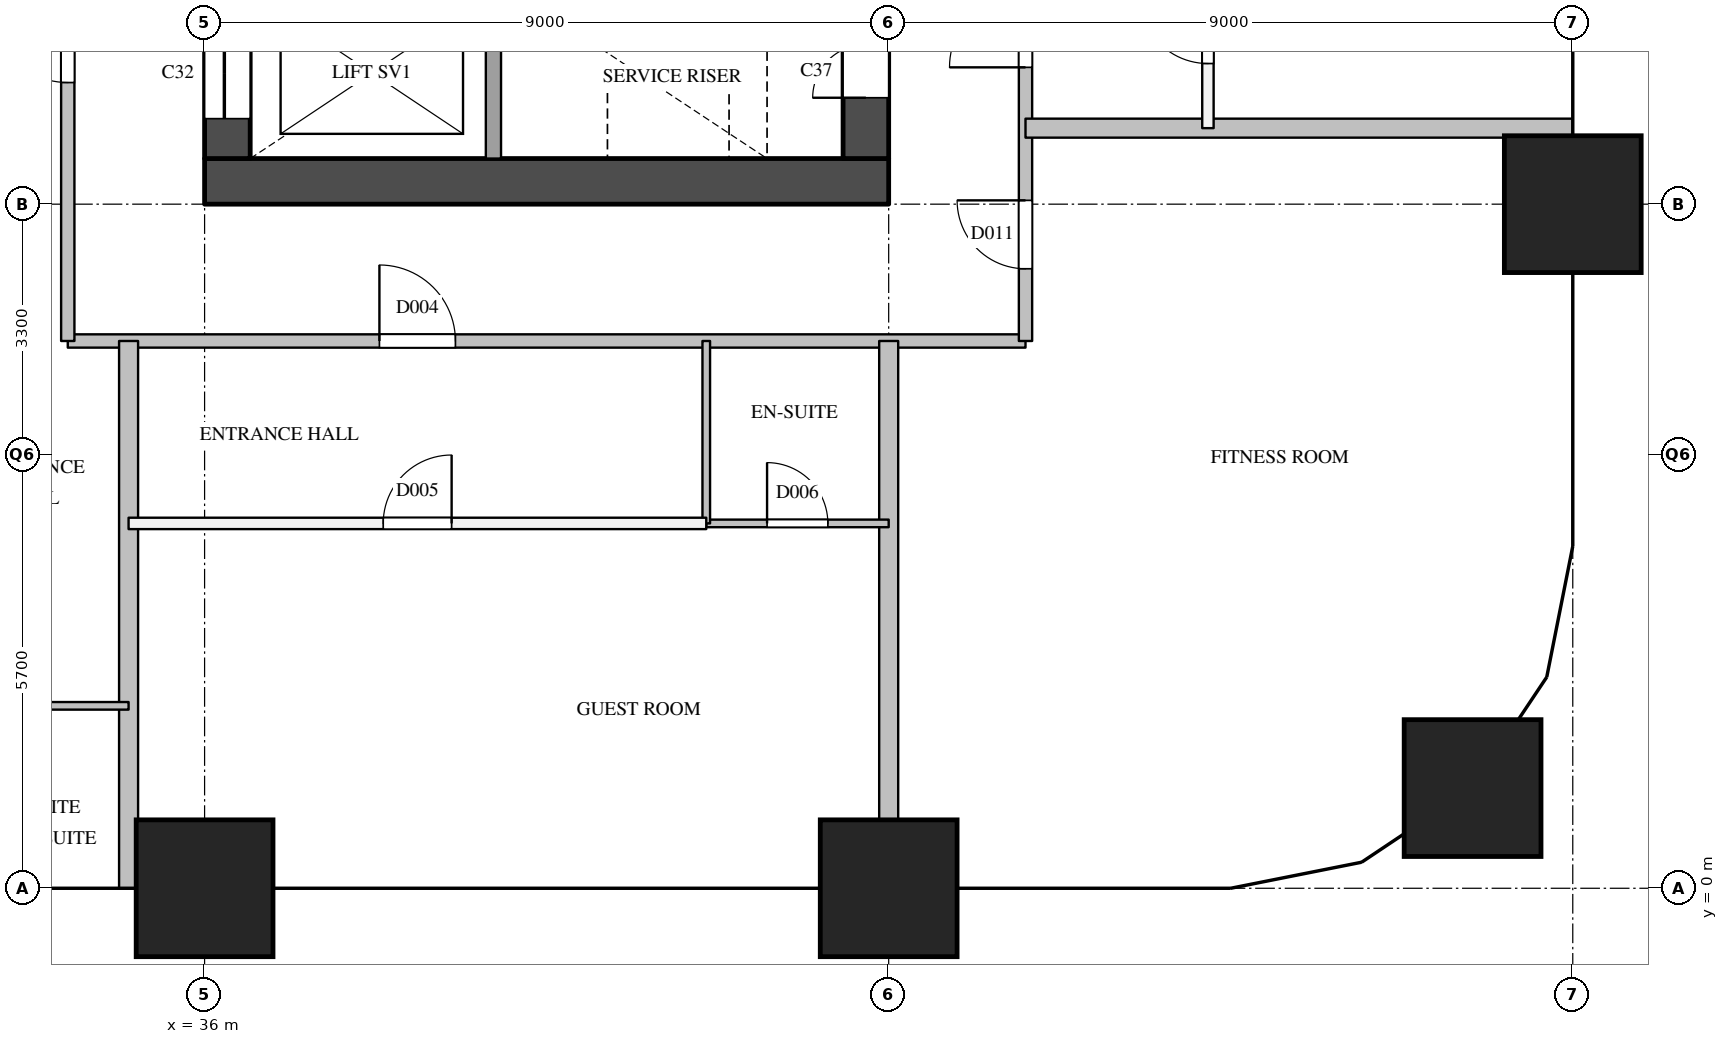
"""IFC4 building model, lengths in metres.
Left out: names, types, materials, properties, quantities, classifications, styles, units other than length and angle.
Written with IfcOpenShell. Run it as: python <this file> out.ifc"""

import sys

from ifc_helpers import new_model, si_unit, direction, frame, frame_2d, origin, origin_2d, place, context, subcontext, project, spatial, rectangle, extrude, element, fill, save


model = new_model("IFC4")
c1 = context("Model", 3, precision=1e-05, world=origin(), true_north=direction((0.0, 1.0)))
c2 = subcontext(c1, "Body", "Model", "MODEL_VIEW")
j1 = project(units=[si_unit("LENGTHUNIT", "METRE"), si_unit("PLANEANGLEUNIT", "RADIAN")], contexts=[c1])
p1 = place(None, origin())
s1 = spatial("IfcSite", under=j1, at=p1, CompositionType="ELEMENT")
p2 = place(p1, origin())
s2 = spatial("IfcBuilding", under=s1, at=p2, CompositionType="ELEMENT")
p3 = place(p2, frame((0.0, 0.0, 72.8)))
s3 = spatial("IfcBuildingStorey", under=s2, at=p3, CompositionType="ELEMENT", Elevation=72.8)
for number, where, z_axis, x_axis in (
    (1, (36.0, 0.0, 0.0), (0.0, 0.0, 1.0), (1.0, 0.0, 0.0)),
    (2, (45.0, 0.0, 0.0), (0.0, 0.0, 1.0), (1.0, 0.0, 0.0)),
    (3, (52.682, 1.318, 0.0), (0.0, 0.0, 1.0), (1.0, 0.0, 0.0)),
    (4, (54.0, 9.0, 0.0), (0.0, 0.0, 1.0), (1.0, 0.0, 0.0)),
):
    element("IfcColumn", number, at=place(p3, frame(where, z_axis=z_axis, x_axis=x_axis)), inside=s3, PredefinedType="COLUMN", context=c2, shape_type="SweptSolid", body=[
        extrude(rectangle(XDim=1.8, YDim=1.8, at=origin_2d()), origin(), (0.0, 0.0, 1.0), 5.0),
    ])
p4 = place(p3, frame((36.0, 9.3, 0.0), z_axis=(0.0, 0.0, 1.0), x_axis=(1.0, 0.0, 0.0)))
e5 = element("IfcWall", 5, at=p4, inside=s3, PredefinedType="SHEAR", context=c2, shape_type="SweptSolid", body=[
    extrude(rectangle(XDim=9.0, YDim=0.6, at=frame_2d((4.5, 0.0))), origin(), (0.0, 0.0, 1.0), 4.7),
])
p5 = place(p3, frame((36.3, 9.6, 0.0), z_axis=(0.0, 0.0, 1.0), x_axis=(0.0, 1.0, 0.0)))
e6 = element("IfcWall", 6, at=p5, inside=s3, PredefinedType="SHEAR", context=c2, shape_type="SweptSolid", body=[
    extrude(rectangle(XDim=12.3, YDim=0.6, at=frame_2d((6.15, 0.0))), origin(), (0.0, 0.0, 1.0), 4.7),
])
p6 = place(p5, frame((0.525, 0.0, 0.0)))
e7 = element("IfcOpeningElement", 7, at=p6, cuts=e6, PredefinedType="OPENING", context=c2, shape_type="SweptSolid", body=[
    extrude(rectangle(XDim=1.2, YDim=2.1, at=frame_2d((0.6, 1.05))), frame((0.0, 0.31, 0.0), z_axis=(0.0, -1.0, 0.0), x_axis=(1.0, 0.0, 0.0)), (0.0, 0.0, 1.0), 0.62),
])
p7 = place(p5, frame((4.8, 0.0, 0.0)))
e8 = element("IfcOpeningElement", 8, at=p7, cuts=e6, PredefinedType="OPENING", context=c2, shape_type="SweptSolid", body=[
    extrude(rectangle(XDim=1.0, YDim=2.1, at=frame_2d((0.5, 1.05))), frame((0.0, 0.31, 0.0), z_axis=(0.0, -1.0, 0.0), x_axis=(1.0, 0.0, 0.0)), (0.0, 0.0, 1.0), 0.62),
])
p8 = place(p3, frame((44.7, 9.6, 0.0), z_axis=(0.0, 0.0, 1.0), x_axis=(0.0, 1.0, 0.0)))
e9 = element("IfcWall", 9, at=p8, inside=s3, PredefinedType="SHEAR", context=c2, shape_type="SweptSolid", body=[
    extrude(rectangle(XDim=12.3, YDim=0.6, at=frame_2d((6.15, 0.0))), origin(), (0.0, 0.0, 1.0), 4.7),
])
p9 = place(p8, frame((0.8, 0.0, 0.0)))
e10 = element("IfcOpeningElement", 10, at=p9, cuts=e9, PredefinedType="OPENING", context=c2, shape_type="SweptSolid", body=[
    extrude(rectangle(XDim=0.7, YDim=2.1, at=frame_2d((0.35, 1.05))), frame((0.0, 0.31, 0.0), z_axis=(0.0, -1.0, 0.0), x_axis=(1.0, 0.0, 0.0)), (0.0, 0.0, 1.0), 0.62),
])
p10 = place(p3, frame((39.8, 9.6, 0.0), z_axis=(0.0, 0.0, 1.0), x_axis=(0.0, 1.0, 0.0)))
e11 = element("IfcWall", 11, at=p10, inside=s3, PredefinedType="SOLIDWALL", context=c2, shape_type="SweptSolid", body=[
    extrude(rectangle(XDim=2.3, YDim=0.2, at=frame_2d((1.15, 0.0))), origin(), (0.0, 0.0, 1.0), 4.7),
])
p11 = place(p3, frame((34.2, 7.2, 0.0), z_axis=(0.0, 0.0, 1.0), x_axis=(1.0, 0.0, 0.0)))
e12 = element("IfcWall", 12, at=p11, inside=s3, PredefinedType="PARTITIONING", context=c2, shape_type="SweptSolid", body=[
    extrude(rectangle(XDim=12.6, YDim=0.175, at=frame_2d((6.3, 0.0))), origin(), (0.0, 0.0, 1.0), 4.7),
])
p12 = place(p11, frame((4.1, 0.0, 0.0)))
e13 = element("IfcOpeningElement", 13, at=p12, cuts=e12, PredefinedType="OPENING", context=c2, shape_type="SweptSolid", body=[
    extrude(rectangle(XDim=1.0, YDim=2.1, at=frame_2d((0.5, 1.05))), frame((0.0, 0.097, 0.0), z_axis=(0.0, -1.0, 0.0), x_axis=(1.0, 0.0, 0.0)), (0.0, 0.0, 1.0), 0.195),
])
p13 = place(p3, frame((34.2, 7.2, 0.0), z_axis=(0.0, 0.0, 1.0), x_axis=(0.0, 1.0, 0.0)))
e14 = element("IfcWall", 14, at=p13, inside=s3, PredefinedType="PARTITIONING", context=c2, shape_type="SweptSolid", body=[
    extrude(rectangle(XDim=16.49, YDim=0.175, at=frame_2d((8.245, 0.0))), origin(), (0.0, 0.0, 1.0), 4.7),
])
p14 = place(p13, frame((3.4, 0.0, 0.0)))
e15 = element("IfcOpeningElement", 15, at=p14, cuts=e14, PredefinedType="OPENING", context=c2, shape_type="SweptSolid", body=[
    extrude(rectangle(XDim=1.0, YDim=2.1, at=frame_2d((0.5, 1.05))), frame((0.0, 0.097, 0.0), z_axis=(0.0, -1.0, 0.0), x_axis=(1.0, 0.0, 0.0)), (0.0, 0.0, 1.0), 0.195),
])
p15 = place(p13, frame((11.645, 0.0, 0.0)))
e16 = element("IfcOpeningElement", 16, at=p15, cuts=e14, PredefinedType="OPENING", context=c2, shape_type="SweptSolid", body=[
    extrude(rectangle(XDim=1.0, YDim=2.1, at=frame_2d((0.5, 1.05))), frame((0.0, 0.097, 0.0), z_axis=(0.0, -1.0, 0.0), x_axis=(1.0, 0.0, 0.0)), (0.0, 0.0, 1.0), 0.195),
])
p16 = place(p3, frame((46.8, 7.2, 0.0), z_axis=(0.0, 0.0, 1.0), x_axis=(0.0, 1.0, 0.0)))
e17 = element("IfcWall", 17, at=p16, inside=s3, PredefinedType="PARTITIONING", context=c2, shape_type="SweptSolid", body=[
    extrude(rectangle(XDim=16.49, YDim=0.175, at=frame_2d((8.245, 0.0))), origin(), (0.0, 0.0, 1.0), 4.7),
])
p17 = place(p16, frame((0.95, 0.0, 0.0)))
e18 = element("IfcOpeningElement", 18, at=p17, cuts=e17, PredefinedType="OPENING", context=c2, shape_type="SweptSolid", body=[
    extrude(rectangle(XDim=0.9, YDim=2.1, at=frame_2d((0.45, 1.05))), frame((0.0, 0.097, 0.0), z_axis=(0.0, -1.0, 0.0), x_axis=(1.0, 0.0, 0.0)), (0.0, 0.0, 1.0), 0.195),
])
p18 = place(p16, frame((3.6, 0.0, 0.0)))
e19 = element("IfcOpeningElement", 19, at=p18, cuts=e17, PredefinedType="OPENING", context=c2, shape_type="SweptSolid", body=[
    extrude(rectangle(XDim=1.0, YDim=2.1, at=frame_2d((0.5, 1.05))), frame((0.0, 0.097, 0.0), z_axis=(0.0, -1.0, 0.0), x_axis=(1.0, 0.0, 0.0)), (0.0, 0.0, 1.0), 0.195),
])
p19 = place(p16, frame((11.1, 0.0, 0.0)))
e20 = element("IfcOpeningElement", 20, at=p19, cuts=e17, PredefinedType="OPENING", context=c2, shape_type="SweptSolid", body=[
    extrude(rectangle(XDim=1.0, YDim=2.1, at=frame_2d((0.5, 1.05))), frame((0.0, 0.097, 0.0), z_axis=(0.0, -1.0, 0.0), x_axis=(1.0, 0.0, 0.0)), (0.0, 0.0, 1.0), 0.195),
])
p20 = place(p3, frame((35.0, 4.8, 0.0), z_axis=(0.0, 0.0, 1.0), x_axis=(1.0, 0.0, 0.0)))
e21 = element("IfcWall", 21, at=p20, inside=s3, PredefinedType="PARTITIONING", context=c2, shape_type="SweptSolid", body=[
    extrude(rectangle(XDim=7.6, YDim=0.15, at=frame_2d((3.8, 0.0))), origin(), (0.0, 0.0, 1.0), 4.7),
])
p21 = place(p20, frame((3.35, 0.0, 0.0)))
e22 = element("IfcOpeningElement", 22, at=p21, cuts=e21, PredefinedType="OPENING", context=c2, shape_type="SweptSolid", body=[
    extrude(rectangle(XDim=0.9, YDim=2.1, at=frame_2d((0.45, 1.05))), frame((0.0, 0.085, 0.0), z_axis=(0.0, -1.0, 0.0), x_axis=(1.0, 0.0, 0.0)), (0.0, 0.0, 1.0), 0.17),
])
p22 = place(p3, frame((49.2, 10.0, 0.0), z_axis=(0.0, 0.0, 1.0), x_axis=(0.0, 1.0, 0.0)))
e23 = element("IfcWall", 23, at=p22, inside=s3, PredefinedType="PARTITIONING", context=c2, shape_type="SweptSolid", body=[
    extrude(rectangle(XDim=2.6, YDim=0.15, at=frame_2d((1.3, 0.0))), origin(), (0.0, 0.0, 1.0), 4.7),
])
p23 = place(p22, frame((0.85, 0.0, 0.0)))
e24 = element("IfcOpeningElement", 24, at=p23, cuts=e23, PredefinedType="OPENING", context=c2, shape_type="SweptSolid", body=[
    extrude(rectangle(XDim=0.9, YDim=2.1, at=frame_2d((0.45, 1.05))), frame((0.0, 0.085, 0.0), z_axis=(0.0, -1.0, 0.0), x_axis=(1.0, 0.0, 0.0)), (0.0, 0.0, 1.0), 0.17),
])
for number, where, z_axis, x_axis in (
    (25, (46.8, 10.0, 0.0), (0.0, 0.0, 1.0), (1.0, 0.0, 0.0)),
    (26, (35.0, 0.0, 0.0), (0.0, 0.0, 1.0), (0.0, 1.0, 0.0)),
):
    element("IfcWall", number, at=place(p3, frame(where, z_axis=z_axis, x_axis=x_axis)), inside=s3, PredefinedType="PARTITIONING", context=c2, shape_type="SweptSolid", body=[
        extrude(rectangle(XDim=7.2, YDim=0.25, at=frame_2d((3.6, 0.0))), origin(), (0.0, 0.0, 1.0), 3.7),
    ])
p24 = place(p3, frame((45.0, 0.0, 0.0), z_axis=(0.0, 0.0, 1.0), x_axis=(0.0, 1.0, 0.0)))
e27 = element("IfcWall", 27, at=p24, inside=s3, PredefinedType="PARTITIONING", context=c2, shape_type="SweptSolid", body=[
    extrude(rectangle(XDim=7.2, YDim=0.25, at=frame_2d((3.6, 0.0))), origin(), (0.0, 0.0, 1.0), 4.7),
])
p25 = place(p3, frame((32.6, 2.4, 0.0), z_axis=(0.0, 0.0, 1.0), x_axis=(1.0, 0.0, 0.0)))
e28 = element("IfcWall", 28, at=p25, inside=s3, PredefinedType="PARTITIONING", context=c2, shape_type="SweptSolid", body=[
    extrude(rectangle(XDim=2.4, YDim=0.1, at=frame_2d((1.2, 0.0))), origin(), (0.0, 0.0, 1.0), 4.7),
])
p26 = place(p3, frame((42.6, 4.8, 0.0), z_axis=(0.0, 0.0, 1.0), x_axis=(1.0, 0.0, 0.0)))
e29 = element("IfcWall", 29, at=p26, inside=s3, PredefinedType="PARTITIONING", context=c2, shape_type="SweptSolid", body=[
    extrude(rectangle(XDim=2.4, YDim=0.1, at=frame_2d((1.2, 0.0))), origin(), (0.0, 0.0, 1.0), 4.7),
])
p27 = place(p26, frame((0.8, 0.0, 0.0)))
e30 = element("IfcOpeningElement", 30, at=p27, cuts=e29, PredefinedType="OPENING", context=c2, shape_type="SweptSolid", body=[
    extrude(rectangle(XDim=0.8, YDim=2.1, at=frame_2d((0.4, 1.05))), frame((0.0, 0.06, 0.0), z_axis=(0.0, -1.0, 0.0), x_axis=(1.0, 0.0, 0.0)), (0.0, 0.0, 1.0), 0.12),
])
p28 = place(p3, frame((42.6, 4.8, 0.0), z_axis=(0.0, 0.0, 1.0), x_axis=(0.0, 1.0, 0.0)))
e31 = element("IfcWall", 31, at=p28, inside=s3, PredefinedType="PARTITIONING", context=c2, shape_type="SweptSolid", body=[
    extrude(rectangle(XDim=2.4, YDim=0.1, at=frame_2d((1.2, 0.0))), origin(), (0.0, 0.0, 1.0), 4.7),
])
p29 = place(p6, origin())
e32 = element("IfcDoor", 32, at=p29, inside=s3, OperationType="SLIDING_TO_LEFT", PredefinedType="DOOR", context=c2, shape_type="SweptSolid", body=[
    extrude(rectangle(XDim=1.2, YDim=2.1, at=frame_2d((0.6, 1.05))), frame((0.0, 0.025, 0.0), z_axis=(0.0, -1.0, 0.0), x_axis=(1.0, 0.0, 0.0)), (0.0, 0.0, 1.0), 0.05),
])
fill(e7, e32)
p30 = place(p9, origin())
e33 = element("IfcDoor", 33, at=p30, inside=s3, OperationType="SINGLE_SWING_LEFT", PredefinedType="DOOR", context=c2, shape_type="SweptSolid", body=[
    extrude(rectangle(XDim=0.7, YDim=2.1, at=frame_2d((0.35, 1.05))), frame((0.0, 0.025, 0.0), z_axis=(0.0, -1.0, 0.0), x_axis=(1.0, 0.0, 0.0)), (0.0, 0.0, 1.0), 0.05),
])
fill(e10, e33)
p31 = place(p12, origin())
e34 = element("IfcDoor", 34, at=p31, inside=s3, OperationType="SINGLE_SWING_LEFT", PredefinedType="DOOR", context=c2, shape_type="SweptSolid", body=[
    extrude(rectangle(XDim=1.0, YDim=2.1, at=frame_2d((0.5, 1.05))), frame((0.0, 0.025, 0.0), z_axis=(0.0, -1.0, 0.0), x_axis=(1.0, 0.0, 0.0)), (0.0, 0.0, 1.0), 0.05),
])
fill(e13, e34)
p32 = place(p21, origin())
e35 = element("IfcDoor", 35, at=p32, inside=s3, OperationType="SINGLE_SWING_RIGHT", PredefinedType="DOOR", context=c2, shape_type="SweptSolid", body=[
    extrude(rectangle(XDim=0.9, YDim=2.1, at=frame_2d((0.45, 1.05))), frame((0.0, 0.025, 0.0), z_axis=(0.0, -1.0, 0.0), x_axis=(1.0, 0.0, 0.0)), (0.0, 0.0, 1.0), 0.05),
])
fill(e22, e35)
p33 = place(p27, origin())
e36 = element("IfcDoor", 36, at=p33, inside=s3, OperationType="SINGLE_SWING_LEFT", PredefinedType="DOOR", context=c2, shape_type="SweptSolid", body=[
    extrude(rectangle(XDim=0.8, YDim=2.1, at=frame_2d((0.4, 1.05))), frame((0.0, 0.025, 0.0), z_axis=(0.0, -1.0, 0.0), x_axis=(1.0, 0.0, 0.0)), (0.0, 0.0, 1.0), 0.05),
])
fill(e30, e36)
p34 = place(p17, origin())
e37 = element("IfcDoor", 37, at=p34, inside=s3, OperationType="SINGLE_SWING_RIGHT", PredefinedType="DOOR", context=c2, shape_type="SweptSolid", body=[
    extrude(rectangle(XDim=0.9, YDim=2.1, at=frame_2d((0.45, 1.05))), frame((0.0, 0.025, 0.0), z_axis=(0.0, -1.0, 0.0), x_axis=(1.0, 0.0, 0.0)), (0.0, 0.0, 1.0), 0.05),
])
fill(e18, e37)
p35 = place(p14, origin())
e38 = element("IfcDoor", 38, at=p35, inside=s3, OperationType="SINGLE_SWING_RIGHT", PredefinedType="DOOR", context=c2, shape_type="SweptSolid", body=[
    extrude(rectangle(XDim=1.0, YDim=2.1, at=frame_2d((0.5, 1.05))), frame((0.0, 0.025, 0.0), z_axis=(0.0, -1.0, 0.0), x_axis=(1.0, 0.0, 0.0)), (0.0, 0.0, 1.0), 0.05),
])
fill(e15, e38)
p36 = place(p18, origin())
e39 = element("IfcDoor", 39, at=p36, inside=s3, OperationType="SINGLE_SWING_LEFT", PredefinedType="DOOR", context=c2, shape_type="SweptSolid", body=[
    extrude(rectangle(XDim=1.0, YDim=2.1, at=frame_2d((0.5, 1.05))), frame((0.0, 0.025, 0.0), z_axis=(0.0, -1.0, 0.0), x_axis=(1.0, 0.0, 0.0)), (0.0, 0.0, 1.0), 0.05),
])
fill(e19, e39)
p37 = place(p23, origin())
e40 = element("IfcDoor", 40, at=p37, inside=s3, OperationType="SINGLE_SWING_RIGHT", PredefinedType="DOOR", context=c2, shape_type="SweptSolid", body=[
    extrude(rectangle(XDim=0.9, YDim=2.1, at=frame_2d((0.45, 1.05))), frame((0.0, 0.025, 0.0), z_axis=(0.0, -1.0, 0.0), x_axis=(1.0, 0.0, 0.0)), (0.0, 0.0, 1.0), 0.05),
])
fill(e24, e40)
save(model, sys.argv[1])
